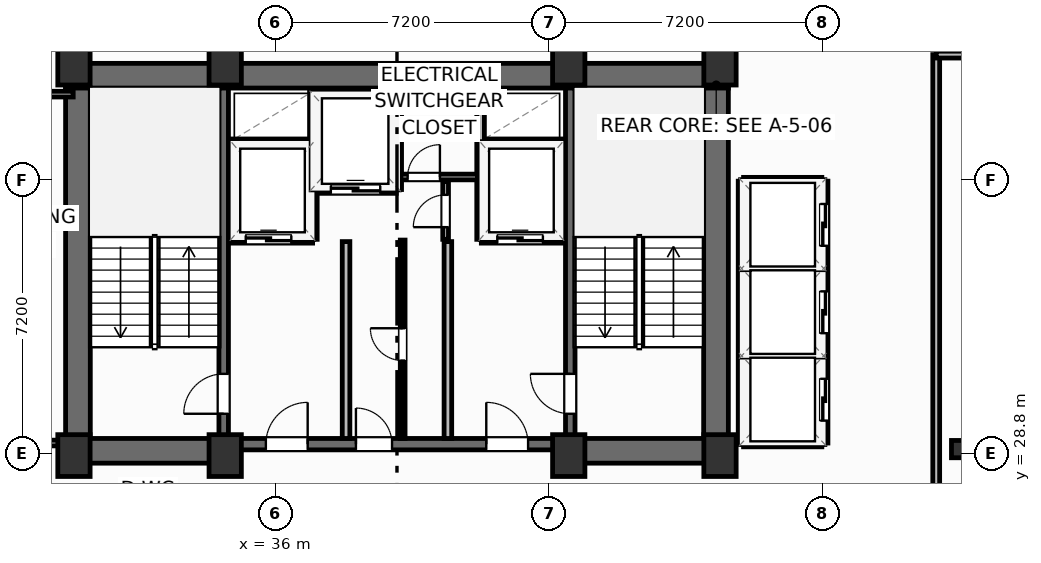
"""IFC4 building model, lengths in metres.
Left out: names, types, materials, properties, quantities, classifications, styles, units other than length and angle.
Written with IfcOpenShell. Run it as: python <this file> out.ifc"""

import sys

from ifc_helpers import new_model, si_unit, direction, frame, frame_2d, origin, origin_2d, place, context, subcontext, project, spatial, rectangle, i_section, extrude, element, fill, save


model = new_model("IFC4")
c1 = context("Model", 3, precision=1e-05, world=origin(), true_north=direction((0.0, 1.0)))
c2 = subcontext(c1, "Body", "Model", "MODEL_VIEW")
j1 = project(units=[si_unit("LENGTHUNIT", "METRE"), si_unit("PLANEANGLEUNIT", "RADIAN")], contexts=[c1])
p1 = place(None, origin())
s1 = spatial("IfcSite", under=j1, at=p1, CompositionType="ELEMENT")
p2 = place(p1, origin())
s2 = spatial("IfcBuilding", under=s1, at=p2, CompositionType="ELEMENT")
p3 = place(p2, frame((0.0, 0.0, 170.9)))
s3 = spatial("IfcBuildingStorey", under=s2, at=p3, CompositionType="ELEMENT", Elevation=170.9)
for number, where, z_axis, x_axis in (
    (1, (30.7, 28.75, 0.0), (0.0, 0.0, 1.0), (1.0, 0.0, 0.0)),
    (2, (34.68, 28.75, 0.0), (0.0, 0.0, 1.0), (1.0, 0.0, 0.0)),
    (3, (43.72, 28.75, 0.0), (0.0, 0.0, 1.0), (1.0, 0.0, 0.0)),
    (4, (47.7, 28.75, 0.0), (0.0, 0.0, 1.0), (1.0, 0.0, 0.0)),
    (5, (30.7, 39.05, 0.0), (0.0, 0.0, 1.0), (1.0, 0.0, 0.0)),
    (6, (34.68, 39.05, 0.0), (0.0, 0.0, 1.0), (1.0, 0.0, 0.0)),
    (7, (43.72, 39.05, 0.0), (0.0, 0.0, 1.0), (1.0, 0.0, 0.0)),
    (8, (47.7, 39.05, 0.0), (0.0, 0.0, 1.0), (1.0, 0.0, 0.0)),
):
    element("IfcColumn", number, at=place(p3, frame(where, z_axis=z_axis, x_axis=x_axis)), inside=s3, PredefinedType="COLUMN", context=c2, shape_type="SweptSolid", body=[
        extrude(rectangle(XDim=0.85, YDim=1.1, at=origin_2d()), origin(), (0.0, 0.0, 1.0), 3.7),
    ])
p4 = place(p3, frame((54.0, 28.92, 0.0), z_axis=(0.0, 0.0, 1.0), x_axis=(1.0, 0.0, 0.0)))
e9 = element("IfcColumn", 9, at=p4, inside=s3, PredefinedType="COLUMN", context=c2, shape_type="SweptSolid", body=[
    extrude(i_section(OverallWidth=0.418, OverallDepth=0.455, WebThickness=0.042, FlangeThickness=0.068, FilletRadius=0.025, at=origin_2d()), origin(), (0.0, 0.0, 1.0), 3.7),
])
p5 = place(p3, frame((30.48, 38.745, 0.0), z_axis=(0.0, 0.0, 1.0), x_axis=(1.0, 0.0, 0.0)))
e10 = element("IfcWall", 10, at=p5, inside=s3, PredefinedType="SHEAR", context=c2, shape_type="SweptSolid", body=[
    extrude(rectangle(XDim=17.44, YDim=0.65, at=frame_2d((8.72, 0.0))), origin(), (0.0, 0.0, 1.0), 3.45),
])
for number, where, z_axis, x_axis in (
    (11, (30.805, 29.2, 0.0), (0.0, 0.0, 1.0), (0.0, 1.0, 0.0)),
    (12, (47.595, 29.2, 0.0), (0.0, 0.0, 1.0), (0.0, 1.0, 0.0)),
):
    element("IfcWall", number, at=place(p3, frame(where, z_axis=z_axis, x_axis=x_axis)), inside=s3, PredefinedType="SHEAR", context=c2, shape_type="SweptSolid", body=[
        extrude(rectangle(XDim=9.22, YDim=0.65, at=frame_2d((4.61, 0.0))), origin(), (0.0, 0.0, 1.0), 3.45),
    ])
p6 = place(p3, frame((30.48, 28.875, 0.0), z_axis=(0.0, 0.0, 1.0), x_axis=(1.0, 0.0, 0.0)))
e13 = element("IfcWall", 13, at=p6, inside=s3, PredefinedType="SHEAR", context=c2, shape_type="SweptSolid", body=[
    extrude(rectangle(XDim=4.32, YDim=0.65, at=frame_2d((2.16, 0.0))), origin(), (0.0, 0.0, 1.0), 3.45),
])
p7 = place(p3, frame((43.6, 28.875, 0.0), z_axis=(0.0, 0.0, 1.0), x_axis=(1.0, 0.0, 0.0)))
e14 = element("IfcWall", 14, at=p7, inside=s3, PredefinedType="SHEAR", context=c2, shape_type="SweptSolid", body=[
    extrude(rectangle(XDim=4.32, YDim=0.65, at=frame_2d((2.16, 0.0))), origin(), (0.0, 0.0, 1.0), 3.45),
])
p8 = place(p3, frame((34.8, 29.05, 0.0), z_axis=(0.0, 0.0, 1.0), x_axis=(1.0, 0.0, 0.0)))
e15 = element("IfcWall", 15, at=p8, inside=s3, PredefinedType="SHEAR", context=c2, shape_type="SweptSolid", body=[
    extrude(rectangle(XDim=8.8, YDim=0.3, at=frame_2d((4.4, 0.0))), origin(), (0.0, 0.0, 1.0), 3.45),
])
p9 = place(p8, frame((0.95, 0.0, 0.0)))
e16 = element("IfcOpeningElement", 16, at=p9, cuts=e15, PredefinedType="OPENING", context=c2, shape_type="SweptSolid", body=[
    extrude(rectangle(XDim=1.1, YDim=2.15, at=frame_2d((0.55, 1.075))), frame((0.0, 0.16, 0.0), z_axis=(0.0, -1.0, 0.0), x_axis=(1.0, 0.0, 0.0)), (0.0, 0.0, 1.0), 0.32),
])
p10 = place(p8, frame((6.75, 0.0, 0.0)))
e17 = element("IfcOpeningElement", 17, at=p10, cuts=e15, PredefinedType="OPENING", context=c2, shape_type="SweptSolid", body=[
    extrude(rectangle(XDim=1.1, YDim=2.15, at=frame_2d((0.55, 1.075))), frame((0.0, 0.16, 0.0), z_axis=(0.0, -1.0, 0.0), x_axis=(1.0, 0.0, 0.0)), (0.0, 0.0, 1.0), 0.32),
])
p11 = place(p8, frame((3.32, 0.0, 0.0)))
e18 = element("IfcOpeningElement", 18, at=p11, cuts=e15, PredefinedType="OPENING", context=c2, shape_type="SweptSolid", body=[
    extrude(rectangle(XDim=0.95, YDim=2.15, at=frame_2d((0.475, 1.075))), frame((0.0, 0.16, 0.0), z_axis=(0.0, -1.0, 0.0), x_axis=(1.0, 0.0, 0.0)), (0.0, 0.0, 1.0), 0.32),
])
p12 = place(p3, frame((34.64, 29.2, 0.0), z_axis=(0.0, 0.0, 1.0), x_axis=(0.0, 1.0, 0.0)))
e19 = element("IfcWall", 19, at=p12, inside=s3, PredefinedType="SHEAR", context=c2, shape_type="SweptSolid", body=[
    extrude(rectangle(XDim=9.22, YDim=0.25, at=frame_2d((4.61, 0.0))), origin(), (0.0, 0.0, 1.0), 3.45),
])
p13 = place(p12, frame((0.65, 0.0, 0.0)))
e20 = element("IfcOpeningElement", 20, at=p13, cuts=e19, PredefinedType="OPENING", context=c2, shape_type="SweptSolid", body=[
    extrude(rectangle(XDim=1.05, YDim=2.15, at=frame_2d((0.525, 1.075))), frame((0.0, 0.135, 0.0), z_axis=(0.0, -1.0, 0.0), x_axis=(1.0, 0.0, 0.0)), (0.0, 0.0, 1.0), 0.27),
])
p14 = place(p3, frame((43.76, 29.2, 0.0), z_axis=(0.0, 0.0, 1.0), x_axis=(0.0, 1.0, 0.0)))
e21 = element("IfcWall", 21, at=p14, inside=s3, PredefinedType="SHEAR", context=c2, shape_type="SweptSolid", body=[
    extrude(rectangle(XDim=9.22, YDim=0.25, at=frame_2d((4.61, 0.0))), origin(), (0.0, 0.0, 1.0), 3.45),
])
p15 = place(p14, frame((0.65, 0.0, 0.0)))
e22 = element("IfcOpeningElement", 22, at=p15, cuts=e21, PredefinedType="OPENING", context=c2, shape_type="SweptSolid", body=[
    extrude(rectangle(XDim=1.05, YDim=2.15, at=frame_2d((0.525, 1.075))), frame((0.0, 0.135, 0.0), z_axis=(0.0, -1.0, 0.0), x_axis=(1.0, 0.0, 0.0)), (0.0, 0.0, 1.0), 0.27),
])
p16 = place(p3, frame((53.39, 19.24, 0.0), z_axis=(0.0, 0.0, 1.0), x_axis=(0.0, 1.0, 0.0)))
e23 = element("IfcWall", 23, at=p16, inside=s3, PredefinedType="PARTITIONING", context=c2, shape_type="SweptSolid", body=[
    extrude(rectangle(XDim=20.06, YDim=0.18, at=frame_2d((10.03, 0.0))), origin(), (0.0, 0.0, 1.0), 3.45),
])
p17 = place(p16, frame((7.7, 0.0, 0.0)))
e24 = element("IfcOpeningElement", 24, at=p17, cuts=e23, PredefinedType="OPENING", context=c2, shape_type="SweptSolid", body=[
    extrude(rectangle(XDim=0.95, YDim=2.05, at=frame_2d((0.475, 1.025))), frame((0.0, 0.1, 0.0), z_axis=(0.0, -1.0, 0.0), x_axis=(1.0, 0.0, 0.0)), (0.0, 0.0, 1.0), 0.2),
])
p18 = place(p3, frame((53.39, 39.3, 0.0), z_axis=(0.0, 0.0, 1.0), x_axis=(1.0, 0.0, 0.0)))
e25 = element("IfcWall", 25, at=p18, inside=s3, PredefinedType="PARTITIONING", context=c2, shape_type="SweptSolid", body=[
    extrude(rectangle(XDim=19.49, YDim=0.18, at=frame_2d((9.745, 0.0))), origin(), (0.0, 0.0, 1.0), 3.45),
])
for number, where, z_axis, x_axis in (
    (26, (37.86, 29.2, 0.0), (0.0, 0.0, 1.0), (0.0, 1.0, 0.0)),
    (27, (40.54, 29.2, 0.0), (0.0, 0.0, 1.0), (0.0, 1.0, 0.0)),
):
    element("IfcWall", number, at=place(p3, frame(where, z_axis=z_axis, x_axis=x_axis)), inside=s3, PredefinedType="PARTITIONING", context=c2, shape_type="SweptSolid", body=[
        extrude(rectangle(XDim=5.18, YDim=0.2, at=frame_2d((2.59, 0.0))), origin(), (0.0, 0.0, 1.0), 3.45),
    ])
p19 = place(p3, frame((34.8, 34.44, 0.0), z_axis=(0.0, 0.0, 1.0), x_axis=(1.0, 0.0, 0.0)))
e28 = element("IfcWall", 28, at=p19, inside=s3, PredefinedType="PARTITIONING", context=c2, shape_type="SweptSolid", body=[
    extrude(rectangle(XDim=2.18, YDim=0.2, at=frame_2d((1.09, 0.0))), origin(), (0.0, 0.0, 1.0), 3.45),
])
p20 = place(p19, frame((0.42, 0.0, 0.0)))
e29 = element("IfcOpeningElement", 29, at=p20, cuts=e28, PredefinedType="OPENING", context=c2, shape_type="SweptSolid", body=[
    extrude(rectangle(XDim=1.2, YDim=2.2, at=frame_2d((0.6, 1.1))), frame((0.0, 0.11, 0.0), z_axis=(0.0, -1.0, 0.0), x_axis=(1.0, 0.0, 0.0)), (0.0, 0.0, 1.0), 0.22),
])
p21 = place(p3, frame((34.8, 36.98, 0.0), z_axis=(0.0, 0.0, 1.0), x_axis=(1.0, 0.0, 0.0)))
e30 = element("IfcWall", 30, at=p21, inside=s3, PredefinedType="PARTITIONING", context=c2, shape_type="SweptSolid", body=[
    extrude(rectangle(XDim=2.18, YDim=0.2, at=frame_2d((1.09, 0.0))), origin(), (0.0, 0.0, 1.0), 3.45),
])
p22 = place(p3, frame((37.0, 34.44, 0.0), z_axis=(0.0, 0.0, 1.0), x_axis=(0.0, 1.0, 0.0)))
e31 = element("IfcWall", 31, at=p22, inside=s3, PredefinedType="PARTITIONING", context=c2, shape_type="SweptSolid", body=[
    extrude(rectangle(XDim=3.9, YDim=0.2, at=frame_2d((1.95, 0.0))), origin(), (0.0, 0.0, 1.0), 3.45),
])
p23 = place(p3, frame((41.42, 34.44, 0.0), z_axis=(0.0, 0.0, 1.0), x_axis=(1.0, 0.0, 0.0)))
e32 = element("IfcWall", 32, at=p23, inside=s3, PredefinedType="PARTITIONING", context=c2, shape_type="SweptSolid", body=[
    extrude(rectangle(XDim=2.18, YDim=0.2, at=frame_2d((1.09, 0.0))), origin(), (0.0, 0.0, 1.0), 3.45),
])
p24 = place(p23, frame((0.42, 0.0, 0.0)))
e33 = element("IfcOpeningElement", 33, at=p24, cuts=e32, PredefinedType="OPENING", context=c2, shape_type="SweptSolid", body=[
    extrude(rectangle(XDim=1.2, YDim=2.2, at=frame_2d((0.6, 1.1))), frame((0.0, 0.11, 0.0), z_axis=(0.0, -1.0, 0.0), x_axis=(1.0, 0.0, 0.0)), (0.0, 0.0, 1.0), 0.22),
])
p25 = place(p3, frame((41.42, 36.98, 0.0), z_axis=(0.0, 0.0, 1.0), x_axis=(1.0, 0.0, 0.0)))
e34 = element("IfcWall", 34, at=p25, inside=s3, PredefinedType="PARTITIONING", context=c2, shape_type="SweptSolid", body=[
    extrude(rectangle(XDim=2.18, YDim=0.2, at=frame_2d((1.09, 0.0))), origin(), (0.0, 0.0, 1.0), 3.45),
])
p26 = place(p3, frame((41.4, 34.44, 0.0), z_axis=(0.0, 0.0, 1.0), x_axis=(0.0, 1.0, 0.0)))
e35 = element("IfcWall", 35, at=p26, inside=s3, PredefinedType="PARTITIONING", context=c2, shape_type="SweptSolid", body=[
    extrude(rectangle(XDim=3.9, YDim=0.2, at=frame_2d((1.95, 0.0))), origin(), (0.0, 0.0, 1.0), 3.45),
])
p27 = place(p3, frame((37.06, 35.75, 0.0), z_axis=(0.0, 0.0, 1.0), x_axis=(1.0, 0.0, 0.0)))
e36 = element("IfcWall", 36, at=p27, inside=s3, PredefinedType="PARTITIONING", context=c2, shape_type="SweptSolid", body=[
    extrude(rectangle(XDim=2.12, YDim=0.2, at=frame_2d((1.06, 0.0))), origin(), (0.0, 0.0, 1.0), 3.45),
])
p28 = place(p27, frame((0.4, 0.0, 0.0)))
e37 = element("IfcOpeningElement", 37, at=p28, cuts=e36, PredefinedType="OPENING", context=c2, shape_type="SweptSolid", body=[
    extrude(rectangle(XDim=1.3, YDim=2.2, at=frame_2d((0.65, 1.1))), frame((0.0, 0.11, 0.0), z_axis=(0.0, -1.0, 0.0), x_axis=(1.0, 0.0, 0.0)), (0.0, 0.0, 1.0), 0.22),
])
p29 = place(p3, frame((39.22, 35.75, 0.0), z_axis=(0.0, 0.0, 1.0), x_axis=(0.0, 1.0, 0.0)))
e38 = element("IfcWall", 38, at=p29, inside=s3, PredefinedType="PARTITIONING", context=c2, shape_type="SweptSolid", body=[
    extrude(rectangle(XDim=2.59, YDim=0.2, at=frame_2d((1.295, 0.0))), origin(), (0.0, 0.0, 1.0), 3.45),
])
p30 = place(p3, frame((39.3, 36.08, 0.0), z_axis=(0.0, 0.0, 1.0), x_axis=(1.0, 0.0, 0.0)))
e39 = element("IfcWall", 39, at=p30, inside=s3, PredefinedType="PARTITIONING", context=c2, shape_type="SweptSolid", body=[
    extrude(rectangle(XDim=2.02, YDim=0.15, at=frame_2d((1.01, 0.0))), origin(), (0.0, 0.0, 1.0), 3.45),
])
p31 = place(p30, frame((0.18, 0.0, 0.0)))
e40 = element("IfcOpeningElement", 40, at=p31, cuts=e39, PredefinedType="OPENING", context=c2, shape_type="SweptSolid", body=[
    extrude(rectangle(XDim=0.85, YDim=2.05, at=frame_2d((0.425, 1.025))), frame((0.0, 0.085, 0.0), z_axis=(0.0, -1.0, 0.0), x_axis=(1.0, 0.0, 0.0)), (0.0, 0.0, 1.0), 0.17),
])
p32 = place(p3, frame((40.48, 34.44, 0.0), z_axis=(0.0, 0.0, 1.0), x_axis=(0.0, 1.0, 0.0)))
e41 = element("IfcWall", 41, at=p32, inside=s3, PredefinedType="PARTITIONING", context=c2, shape_type="SweptSolid", body=[
    extrude(rectangle(XDim=1.52, YDim=0.15, at=frame_2d((0.76, 0.0))), origin(), (0.0, 0.0, 1.0), 3.45),
])
p33 = place(p32, frame((0.32, 0.0, 0.0)))
e42 = element("IfcOpeningElement", 42, at=p33, cuts=e41, PredefinedType="OPENING", context=c2, shape_type="SweptSolid", body=[
    extrude(rectangle(XDim=0.85, YDim=2.05, at=frame_2d((0.425, 1.025))), frame((0.0, 0.085, 0.0), z_axis=(0.0, -1.0, 0.0), x_axis=(1.0, 0.0, 0.0)), (0.0, 0.0, 1.0), 0.17),
])
p34 = place(p3, frame((39.35, 29.2, 0.0), z_axis=(0.0, 0.0, 1.0), x_axis=(0.0, 1.0, 0.0)))
e43 = element("IfcWall", 43, at=p34, inside=s3, PredefinedType="PARTITIONING", context=c2, shape_type="SweptSolid", body=[
    extrude(rectangle(XDim=5.22, YDim=0.125, at=frame_2d((2.61, 0.0))), origin(), (0.0, 0.0, 1.0), 3.45),
])
p35 = place(p34, frame((2.05, 0.0, 0.0)))
e44 = element("IfcOpeningElement", 44, at=p35, cuts=e43, PredefinedType="OPENING", context=c2, shape_type="SweptSolid", body=[
    extrude(rectangle(XDim=0.85, YDim=2.05, at=frame_2d((0.425, 1.025))), frame((0.0, 0.073, 0.0), z_axis=(0.0, -1.0, 0.0), x_axis=(1.0, 0.0, 0.0)), (0.0, 0.0, 1.0), 0.145),
])
p36 = place(p3, frame((26.78, 29.08, 0.0), z_axis=(0.0, 0.0, 1.0), x_axis=(1.0, 0.0, 0.0)))
e45 = element("IfcWall", 45, at=p36, inside=s3, PredefinedType="PARTITIONING", context=c2, shape_type="SweptSolid", body=[
    extrude(rectangle(XDim=3.7, YDim=0.15, at=frame_2d((1.85, 0.0))), origin(), (0.0, 0.0, 1.0), 3.45),
])
p37 = place(p3, frame((26.78, 38.26, 0.0), z_axis=(0.0, 0.0, 1.0), x_axis=(1.0, 0.0, 0.0)))
e46 = element("IfcWall", 46, at=p37, inside=s3, PredefinedType="PARTITIONING", context=c2, shape_type="SweptSolid", body=[
    extrude(rectangle(XDim=3.9, YDim=0.15, at=frame_2d((1.95, 0.0))), origin(), (0.0, 0.0, 1.0), 3.45),
])
for number, where, z_axis, x_axis in (
    (47, (48.32, 31.375, 0.0), (0.0, 0.0, 1.0), (1.0, 0.0, 0.0)),
    (48, (48.32, 33.675, 0.0), (0.0, 0.0, 1.0), (1.0, 0.0, 0.0)),
):
    element("IfcWall", number, at=place(p3, frame(where, z_axis=z_axis, x_axis=x_axis)), inside=s3, PredefinedType="PARTITIONING", context=c2, shape_type="SweptSolid", body=[
        extrude(rectangle(XDim=2.06, YDim=0.2, at=frame_2d((1.03, 0.0))), origin(), (0.0, 0.0, 1.0), 3.45),
    ])
p38 = place(p3, frame((48.32, 29.08, 0.0), z_axis=(0.0, 0.0, 1.0), x_axis=(1.0, 0.0, 0.0)))
e49 = element("IfcWall", 49, at=p38, inside=s3, PredefinedType="PARTITIONING", context=c2, shape_type="SweptSolid", body=[
    extrude(rectangle(XDim=2.06, YDim=0.2, at=frame_2d((1.03, 0.0))), origin(), (0.0, 0.0, 1.0), 2.662),
])
p39 = place(p3, frame((48.32, 35.97, 0.0), z_axis=(0.0, 0.0, 1.0), x_axis=(1.0, 0.0, 0.0)))
e50 = element("IfcWall", 50, at=p39, inside=s3, PredefinedType="PARTITIONING", context=c2, shape_type="SweptSolid", body=[
    extrude(rectangle(XDim=2.06, YDim=0.2, at=frame_2d((1.03, 0.0))), origin(), (0.0, 0.0, 1.0), 3.45),
])
p40 = place(p3, frame((48.28, 29.08, 0.0), z_axis=(0.0, 0.0, 1.0), x_axis=(0.0, 1.0, 0.0)))
e51 = element("IfcWall", 51, at=p40, inside=s3, PredefinedType="PARTITIONING", context=c2, shape_type="SweptSolid", body=[
    extrude(rectangle(XDim=6.89, YDim=0.2, at=frame_2d((3.445, 0.0))), origin(), (0.0, 0.0, 1.0), 3.45),
])
p41 = place(p3, frame((50.44, 29.08, 0.0), z_axis=(0.0, 0.0, 1.0), x_axis=(0.0, 1.0, 0.0)))
e52 = element("IfcWall", 52, at=p41, inside=s3, PredefinedType="PARTITIONING", context=c2, shape_type="SweptSolid", body=[
    extrude(rectangle(XDim=6.89, YDim=0.2, at=frame_2d((3.445, 0.0))), origin(), (0.0, 0.0, 1.0), 3.45),
])
p42 = place(p41, frame((0.59, 0.0, 0.0)))
e53 = element("IfcOpeningElement", 53, at=p42, cuts=e52, PredefinedType="OPENING", context=c2, shape_type="SweptSolid", body=[
    extrude(rectangle(XDim=1.1, YDim=2.15, at=frame_2d((0.55, 1.075))), frame((0.0, 0.11, 0.0), z_axis=(0.0, -1.0, 0.0), x_axis=(1.0, 0.0, 0.0)), (0.0, 0.0, 1.0), 0.22),
])
p43 = place(p41, frame((2.89, 0.0, 0.0)))
e54 = element("IfcOpeningElement", 54, at=p43, cuts=e52, PredefinedType="OPENING", context=c2, shape_type="SweptSolid", body=[
    extrude(rectangle(XDim=1.1, YDim=2.15, at=frame_2d((0.55, 1.075))), frame((0.0, 0.11, 0.0), z_axis=(0.0, -1.0, 0.0), x_axis=(1.0, 0.0, 0.0)), (0.0, 0.0, 1.0), 0.22),
])
p44 = place(p41, frame((5.19, 0.0, 0.0)))
e55 = element("IfcOpeningElement", 55, at=p44, cuts=e52, PredefinedType="OPENING", context=c2, shape_type="SweptSolid", body=[
    extrude(rectangle(XDim=1.1, YDim=2.15, at=frame_2d((0.55, 1.075))), frame((0.0, 0.11, 0.0), z_axis=(0.0, -1.0, 0.0), x_axis=(1.0, 0.0, 0.0)), (0.0, 0.0, 1.0), 0.22),
])
p45 = place(p13, origin())
e56 = element("IfcDoor", 56, at=p45, inside=s3, OperationType="SINGLE_SWING_LEFT", PredefinedType="DOOR", context=c2, shape_type="SweptSolid", body=[
    extrude(rectangle(XDim=1.05, YDim=2.15, at=frame_2d((0.525, 1.075))), frame((0.0, 0.025, 0.0), z_axis=(0.0, -1.0, 0.0), x_axis=(1.0, 0.0, 0.0)), (0.0, 0.0, 1.0), 0.05),
])
fill(e20, e56)
p46 = place(p15, origin())
e57 = element("IfcDoor", 57, at=p46, inside=s3, OperationType="SINGLE_SWING_RIGHT", PredefinedType="DOOR", context=c2, shape_type="SweptSolid", body=[
    extrude(rectangle(XDim=1.05, YDim=2.15, at=frame_2d((0.525, 1.075))), frame((0.0, 0.025, 0.0), z_axis=(0.0, -1.0, 0.0), x_axis=(1.0, 0.0, 0.0)), (0.0, 0.0, 1.0), 0.05),
])
fill(e22, e57)
p47 = place(p9, origin())
e58 = element("IfcDoor", 58, at=p47, inside=s3, OperationType="SINGLE_SWING_RIGHT", PredefinedType="DOOR", context=c2, shape_type="SweptSolid", body=[
    extrude(rectangle(XDim=1.1, YDim=2.15, at=frame_2d((0.55, 1.075))), frame((0.0, 0.025, 0.0), z_axis=(0.0, -1.0, 0.0), x_axis=(1.0, 0.0, 0.0)), (0.0, 0.0, 1.0), 0.05),
])
fill(e16, e58)
p48 = place(p10, origin())
e59 = element("IfcDoor", 59, at=p48, inside=s3, OperationType="SINGLE_SWING_LEFT", PredefinedType="DOOR", context=c2, shape_type="SweptSolid", body=[
    extrude(rectangle(XDim=1.1, YDim=2.15, at=frame_2d((0.55, 1.075))), frame((0.0, 0.025, 0.0), z_axis=(0.0, -1.0, 0.0), x_axis=(1.0, 0.0, 0.0)), (0.0, 0.0, 1.0), 0.05),
])
fill(e17, e59)
p49 = place(p20, origin())
e60 = element("IfcDoor", 60, at=p49, inside=s3, OperationType="SLIDING_TO_LEFT", PredefinedType="DOOR", context=c2, shape_type="SweptSolid", body=[
    extrude(rectangle(XDim=1.2, YDim=2.2, at=frame_2d((0.6, 1.1))), frame((0.0, 0.025, 0.0), z_axis=(0.0, -1.0, 0.0), x_axis=(1.0, 0.0, 0.0)), (0.0, 0.0, 1.0), 0.05),
])
fill(e29, e60)
p50 = place(p24, origin())
e61 = element("IfcDoor", 61, at=p50, inside=s3, OperationType="SLIDING_TO_LEFT", PredefinedType="DOOR", context=c2, shape_type="SweptSolid", body=[
    extrude(rectangle(XDim=1.2, YDim=2.2, at=frame_2d((0.6, 1.1))), frame((0.0, 0.025, 0.0), z_axis=(0.0, -1.0, 0.0), x_axis=(1.0, 0.0, 0.0)), (0.0, 0.0, 1.0), 0.05),
])
fill(e33, e61)
p51 = place(p28, origin())
e62 = element("IfcDoor", 62, at=p51, inside=s3, OperationType="SLIDING_TO_LEFT", PredefinedType="DOOR", context=c2, shape_type="SweptSolid", body=[
    extrude(rectangle(XDim=1.3, YDim=2.2, at=frame_2d((0.65, 1.1))), frame((0.0, 0.025, 0.0), z_axis=(0.0, -1.0, 0.0), x_axis=(1.0, 0.0, 0.0)), (0.0, 0.0, 1.0), 0.05),
])
fill(e37, e62)
p52 = place(p31, origin())
e63 = element("IfcDoor", 63, at=p52, inside=s3, OperationType="SINGLE_SWING_RIGHT", PredefinedType="DOOR", context=c2, shape_type="SweptSolid", body=[
    extrude(rectangle(XDim=0.85, YDim=2.05, at=frame_2d((0.425, 1.025))), frame((0.0, 0.025, 0.0), z_axis=(0.0, -1.0, 0.0), x_axis=(1.0, 0.0, 0.0)), (0.0, 0.0, 1.0), 0.05),
])
fill(e40, e63)
p53 = place(p33, origin())
e64 = element("IfcDoor", 64, at=p53, inside=s3, OperationType="SINGLE_SWING_LEFT", PredefinedType="DOOR", context=c2, shape_type="SweptSolid", body=[
    extrude(rectangle(XDim=0.85, YDim=2.05, at=frame_2d((0.425, 1.025))), frame((0.0, 0.025, 0.0), z_axis=(0.0, -1.0, 0.0), x_axis=(1.0, 0.0, 0.0)), (0.0, 0.0, 1.0), 0.05),
])
fill(e42, e64)
p54 = place(p35, origin())
e65 = element("IfcDoor", 65, at=p54, inside=s3, OperationType="SINGLE_SWING_RIGHT", PredefinedType="DOOR", context=c2, shape_type="SweptSolid", body=[
    extrude(rectangle(XDim=0.85, YDim=2.05, at=frame_2d((0.425, 1.025))), frame((0.0, 0.025, 0.0), z_axis=(0.0, -1.0, 0.0), x_axis=(1.0, 0.0, 0.0)), (0.0, 0.0, 1.0), 0.05),
])
fill(e44, e65)
p55 = place(p11, origin())
e66 = element("IfcDoor", 66, at=p55, inside=s3, OperationType="SINGLE_SWING_LEFT", PredefinedType="DOOR", context=c2, shape_type="SweptSolid", body=[
    extrude(rectangle(XDim=0.95, YDim=2.15, at=frame_2d((0.475, 1.075))), frame((0.0, 0.025, 0.0), z_axis=(0.0, -1.0, 0.0), x_axis=(1.0, 0.0, 0.0)), (0.0, 0.0, 1.0), 0.05),
])
fill(e18, e66)
p56 = place(p42, origin())
e67 = element("IfcDoor", 67, at=p56, inside=s3, OperationType="SLIDING_TO_LEFT", PredefinedType="DOOR", context=c2, shape_type="SweptSolid", body=[
    extrude(rectangle(XDim=1.1, YDim=2.15, at=frame_2d((0.55, 1.075))), frame((0.0, 0.025, 0.0), z_axis=(0.0, -1.0, 0.0), x_axis=(1.0, 0.0, 0.0)), (0.0, 0.0, 1.0), 0.05),
])
fill(e53, e67)
p57 = place(p43, origin())
e68 = element("IfcDoor", 68, at=p57, inside=s3, OperationType="SLIDING_TO_LEFT", PredefinedType="DOOR", context=c2, shape_type="SweptSolid", body=[
    extrude(rectangle(XDim=1.1, YDim=2.15, at=frame_2d((0.55, 1.075))), frame((0.0, 0.025, 0.0), z_axis=(0.0, -1.0, 0.0), x_axis=(1.0, 0.0, 0.0)), (0.0, 0.0, 1.0), 0.05),
])
fill(e54, e68)
p58 = place(p44, origin())
e69 = element("IfcDoor", 69, at=p58, inside=s3, OperationType="SLIDING_TO_LEFT", PredefinedType="DOOR", context=c2, shape_type="SweptSolid", body=[
    extrude(rectangle(XDim=1.1, YDim=2.15, at=frame_2d((0.55, 1.075))), frame((0.0, 0.025, 0.0), z_axis=(0.0, -1.0, 0.0), x_axis=(1.0, 0.0, 0.0)), (0.0, 0.0, 1.0), 0.05),
])
fill(e55, e69)
save(model, sys.argv[1])
